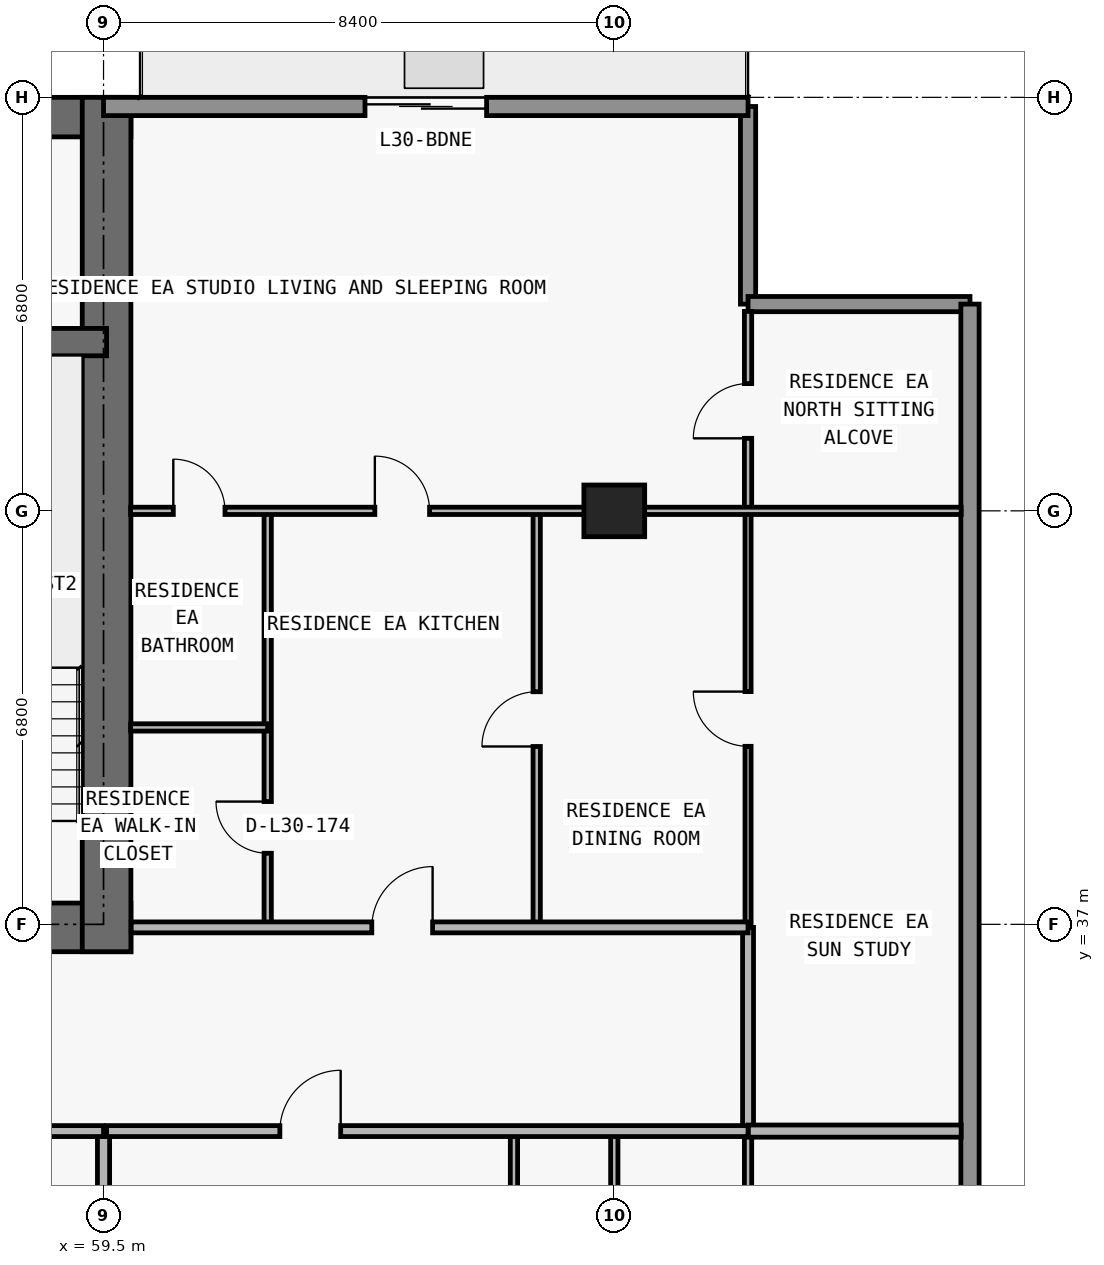
"""IFC4 building model, lengths in metres.
Left out: names, types, materials, properties, quantities, classifications, styles, units other than length and angle.
Written with IfcOpenShell. Run it as: python <this file> out.ifc"""

import sys

from ifc_helpers import new_model, si_unit, direction, frame, frame_2d, origin, origin_2d, place, context, subcontext, project, spatial, rectangle, extrude, element, fill, save


model = new_model("IFC4")
c1 = context("Model", 3, precision=1e-05, world=origin(), true_north=direction((0.0, 1.0)))
c2 = subcontext(c1, "Body", "Model", "MODEL_VIEW")
j1 = project(units=[si_unit("LENGTHUNIT", "METRE"), si_unit("PLANEANGLEUNIT", "RADIAN")], contexts=[c1])
p1 = place(None, origin())
s1 = spatial("IfcSite", under=j1, at=p1, CompositionType="ELEMENT")
p2 = place(p1, origin())
s2 = spatial("IfcBuilding", under=s1, at=p2, CompositionType="ELEMENT")
p3 = place(p2, frame((0.0, 0.0, 112.5)))
s3 = spatial("IfcBuildingStorey", under=s2, at=p3, CompositionType="ELEMENT", Elevation=112.5)
p4 = place(p3, frame((67.9, 43.8, 0.0), z_axis=(0.0, 0.0, 1.0), x_axis=(1.0, 0.0, 0.0)))
e1 = element("IfcColumn", 1, at=p4, inside=s3, PredefinedType="COLUMN", context=c2, shape_type="SweptSolid", body=[
    extrude(rectangle(XDim=1.0, YDim=0.85, at=origin_2d()), origin(), (0.0, 0.0, 1.0), 3.05),
])
p5 = place(p3, frame((17.85, 36.95, 0.0), z_axis=(0.0, 0.0, 1.0), x_axis=(1.0, 0.0, 0.0)))
e2 = element("IfcWall", 2, at=p5, inside=s3, PredefinedType="SHEAR", context=c2, shape_type="SweptSolid", body=[
    extrude(rectangle(XDim=42.1, YDim=0.8, at=frame_2d((21.05, 0.0))), origin(), (0.0, 0.0, 1.0), 3.05),
])
p6 = place(p5, frame((14.45, 0.0, 0.0)))
e3 = element("IfcOpeningElement", 3, at=p6, cuts=e2, PredefinedType="OPENING", context=c2, shape_type="SweptSolid", body=[
    extrude(rectangle(XDim=1.1, YDim=2.15, at=frame_2d((0.55, 1.075))), frame((0.0, 0.41, 0.0), z_axis=(0.0, -1.0, 0.0), x_axis=(1.0, 0.0, 0.0)), (0.0, 0.0, 1.0), 0.82),
])
p7 = place(p5, frame((6.3, 0.0, 0.0)))
e4 = element("IfcOpeningElement", 4, at=p7, cuts=e2, PredefinedType="OPENING", context=c2, shape_type="SweptSolid", body=[
    extrude(rectangle(XDim=1.05, YDim=2.15, at=frame_2d((0.525, 1.075))), frame((0.0, 0.41, 0.0), z_axis=(0.0, -1.0, 0.0), x_axis=(1.0, 0.0, 0.0)), (0.0, 0.0, 1.0), 0.82),
])
p8 = place(p5, frame((34.8, 0.0, 0.0)))
e5 = element("IfcOpeningElement", 5, at=p8, cuts=e2, PredefinedType="OPENING", context=c2, shape_type="SweptSolid", body=[
    extrude(rectangle(XDim=1.05, YDim=2.15, at=frame_2d((0.525, 1.075))), frame((0.0, 0.41, 0.0), z_axis=(0.0, -1.0, 0.0), x_axis=(1.0, 0.0, 0.0)), (0.0, 0.0, 1.0), 0.82),
])
p9 = place(p5, frame((10.913, 0.0, 0.0)))
e6 = element("IfcOpeningElement", 6, at=p9, cuts=e2, PredefinedType="OPENING", context=c2, shape_type="SweptSolid", body=[
    extrude(rectangle(XDim=1.05, YDim=2.15, at=frame_2d((0.525, 1.075))), frame((0.0, 0.41, 0.0), z_axis=(0.0, -1.0, 0.0), x_axis=(1.0, 0.0, 0.0)), (0.0, 0.0, 1.0), 0.82),
])
p10 = place(p5, frame((24.15, 0.0, 0.0)))
e7 = element("IfcOpeningElement", 7, at=p10, cuts=e2, PredefinedType="OPENING", context=c2, shape_type="SweptSolid", body=[
    extrude(rectangle(XDim=1.05, YDim=2.15, at=frame_2d((0.525, 1.075))), frame((0.0, 0.41, 0.0), z_axis=(0.0, -1.0, 0.0), x_axis=(1.0, 0.0, 0.0)), (0.0, 0.0, 1.0), 0.82),
])
p11 = place(p3, frame((17.85, 50.275, 0.0), z_axis=(0.0, 0.0, 1.0), x_axis=(1.0, 0.0, 0.0)))
e8 = element("IfcWall", 8, at=p11, inside=s3, PredefinedType="SHEAR", context=c2, shape_type="SweptSolid", body=[
    extrude(rectangle(XDim=42.1, YDim=0.65, at=frame_2d((21.05, 0.0))), origin(), (0.0, 0.0, 1.0), 3.05),
])
p12 = place(p3, frame((59.55, 36.55, 0.0), z_axis=(0.0, 0.0, 1.0), x_axis=(0.0, 1.0, 0.0)))
e9 = element("IfcWall", 9, at=p12, inside=s3, PredefinedType="SHEAR", context=c2, shape_type="SweptSolid", body=[
    extrude(rectangle(XDim=14.05, YDim=0.8, at=frame_2d((7.025, 0.0))), origin(), (0.0, 0.0, 1.0), 3.05),
])
p13 = place(p3, frame((18.25, 46.575, 0.0), z_axis=(0.0, 0.0, 1.0), x_axis=(1.0, 0.0, 0.0)))
e10 = element("IfcWall", 10, at=p13, inside=s3, PredefinedType="SHEAR", context=c2, shape_type="SweptSolid", body=[
    extrude(rectangle(XDim=41.3, YDim=0.45, at=frame_2d((20.65, 0.0))), origin(), (0.0, 0.0, 1.0), 3.05),
])
p14 = place(p13, frame((7.625, 0.0, 0.0)))
e11 = element("IfcOpeningElement", 11, at=p14, cuts=e10, PredefinedType="OPENING", context=c2, shape_type="SweptSolid", body=[
    extrude(rectangle(XDim=1.05, YDim=2.15, at=frame_2d((0.525, 1.075))), frame((0.0, 0.235, 0.0), z_axis=(0.0, -1.0, 0.0), x_axis=(1.0, 0.0, 0.0)), (0.0, 0.0, 1.0), 0.47),
])
p15 = place(p13, frame((32.675, 0.0, 0.0)))
e12 = element("IfcOpeningElement", 12, at=p15, cuts=e10, PredefinedType="OPENING", context=c2, shape_type="SweptSolid", body=[
    extrude(rectangle(XDim=1.05, YDim=2.15, at=frame_2d((0.525, 1.075))), frame((0.0, 0.235, 0.0), z_axis=(0.0, -1.0, 0.0), x_axis=(1.0, 0.0, 0.0)), (0.0, 0.0, 1.0), 0.47),
])
p16 = place(p3, frame((70.1, 50.45, 0.0), z_axis=(0.0, 0.0, 1.0), x_axis=(0.0, -1.0, 0.0)))
e13 = element("IfcWall", 13, at=p16, inside=s3, PredefinedType="ELEMENTEDWALL", context=c2, shape_type="SweptSolid", body=[
    extrude(rectangle(XDim=3.25, YDim=0.25, at=frame_2d((1.625, 0.0))), origin(), (0.0, 0.0, 1.0), 3.05),
])
p17 = place(p3, frame((70.1, 47.2, 0.0), z_axis=(0.0, 0.0, 1.0), x_axis=(1.0, 0.0, 0.0)))
e14 = element("IfcWall", 14, at=p17, inside=s3, PredefinedType="ELEMENTEDWALL", context=c2, shape_type="SweptSolid", body=[
    extrude(rectangle(XDim=3.65, YDim=0.25, at=frame_2d((1.825, 0.0))), origin(), (0.0, 0.0, 1.0), 3.05),
])
p18 = place(p3, frame((73.75, 47.2, 0.0), z_axis=(0.0, 0.0, 1.0), x_axis=(0.0, -1.0, 0.0)))
e15 = element("IfcWall", 15, at=p18, inside=s3, PredefinedType="STANDARD", context=c2, shape_type="SweptSolid", body=[
    extrude(rectangle(XDim=19.2, YDim=0.3, at=frame_2d((9.6, 0.0))), origin(), (0.0, 0.0, 1.0), 3.05),
])
p19 = place(p3, frame((59.5, 50.45, 0.0), z_axis=(0.0, 0.0, 1.0), x_axis=(1.0, 0.0, 0.0)))
e16 = element("IfcWall", 16, at=p19, inside=s3, PredefinedType="STANDARD", context=c2, shape_type="SweptSolid", body=[
    extrude(rectangle(XDim=10.6, YDim=0.3, at=frame_2d((5.3, 0.0))), origin(), (0.0, 0.0, 1.0), 3.05),
])
p20 = place(p19, frame((4.3, 0.0, 0.0)))
e17 = element("IfcOpeningElement", 17, at=p20, cuts=e16, PredefinedType="OPENING", context=c2, shape_type="SweptSolid", body=[
    extrude(rectangle(XDim=2.0, YDim=2.3, at=frame_2d((1.0, 1.15))), frame((0.0, 0.16, 0.0), z_axis=(0.0, -1.0, 0.0), x_axis=(1.0, 0.0, 0.0)), (0.0, 0.0, 1.0), 0.32),
])
p21 = place(p3, frame((59.5, 27.08, 0.0), z_axis=(0.0, 0.0, 1.0), x_axis=(0.0, 1.0, 0.0)))
e18 = element("IfcWall", 18, at=p21, inside=s3, PredefinedType="PARTITIONING", context=c2, shape_type="SweptSolid", body=[
    extrude(rectangle(XDim=6.52, YDim=0.2, at=frame_2d((3.26, 0.0))), origin(), (0.0, 0.0, 1.0), 2.174),
])
p22 = place(p3, frame((62.2, 36.95, 0.0), z_axis=(0.0, 0.0, 1.0), x_axis=(0.0, 1.0, 0.0)))
e19 = element("IfcWall", 19, at=p22, inside=s3, PredefinedType="PARTITIONING", context=c2, shape_type="SweptSolid", body=[
    extrude(rectangle(XDim=6.85, YDim=0.12, at=frame_2d((3.425, 0.0))), origin(), (0.0, 0.0, 1.0), 3.05),
])
p23 = place(p22, frame((1.219, 0.0, 0.0)))
e20 = element("IfcOpeningElement", 20, at=p23, cuts=e19, PredefinedType="OPENING", context=c2, shape_type="SweptSolid", body=[
    extrude(rectangle(XDim=0.85, YDim=2.1, at=frame_2d((0.425, 1.05))), frame((0.0, 0.07, 0.0), z_axis=(0.0, -1.0, 0.0), x_axis=(1.0, 0.0, 0.0)), (0.0, 0.0, 1.0), 0.14),
])
p24 = place(p3, frame((66.25, 27.08, 0.0), z_axis=(0.0, 0.0, 1.0), x_axis=(0.0, 1.0, 0.0)))
e21 = element("IfcWall", 21, at=p24, inside=s3, PredefinedType="PARTITIONING", context=c2, shape_type="SweptSolid", body=[
    extrude(rectangle(XDim=6.52, YDim=0.12, at=frame_2d((3.26, 0.0))), origin(), (0.0, 0.0, 1.0), 3.05),
])
p25 = place(p24, frame((3.285, 0.0, 0.0)))
e22 = element("IfcOpeningElement", 22, at=p25, cuts=e21, PredefinedType="OPENING", context=c2, shape_type="SweptSolid", body=[
    extrude(rectangle(XDim=0.85, YDim=2.1, at=frame_2d((0.425, 1.05))), frame((0.0, 0.07, 0.0), z_axis=(0.0, -1.0, 0.0), x_axis=(1.0, 0.0, 0.0)), (0.0, 0.0, 1.0), 0.14),
])
p26 = place(p3, frame((66.624, 36.95, 0.0), z_axis=(0.0, 0.0, 1.0), x_axis=(0.0, 1.0, 0.0)))
e23 = element("IfcWall", 23, at=p26, inside=s3, PredefinedType="PARTITIONING", context=c2, shape_type="SweptSolid", body=[
    extrude(rectangle(XDim=6.85, YDim=0.12, at=frame_2d((3.425, 0.0))), origin(), (0.0, 0.0, 1.0), 3.05),
])
p27 = place(p26, frame((2.975, 0.0, 0.0)))
e24 = element("IfcOpeningElement", 24, at=p27, cuts=e23, PredefinedType="OPENING", context=c2, shape_type="SweptSolid", body=[
    extrude(rectangle(XDim=0.9, YDim=2.15, at=frame_2d((0.45, 1.075))), frame((0.0, 0.07, 0.0), z_axis=(0.0, -1.0, 0.0), x_axis=(1.0, 0.0, 0.0)), (0.0, 0.0, 1.0), 0.14),
])
p28 = place(p3, frame((67.9, 27.08, 0.0), z_axis=(0.0, 0.0, 1.0), x_axis=(0.0, 1.0, 0.0)))
e25 = element("IfcWall", 25, at=p28, inside=s3, PredefinedType="PARTITIONING", context=c2, shape_type="SweptSolid", body=[
    extrude(rectangle(XDim=6.52, YDim=0.12, at=frame_2d((3.26, 0.0))), origin(), (0.0, 0.0, 1.0), 2.174),
])
p29 = place(p3, frame((70.1, 27.08, 0.0), z_axis=(0.0, 0.0, 1.0), x_axis=(0.0, 1.0, 0.0)))
e26 = element("IfcWall", 26, at=p29, inside=s3, PredefinedType="PARTITIONING", context=c2, shape_type="SweptSolid", body=[
    extrude(rectangle(XDim=6.52, YDim=0.12, at=frame_2d((3.26, 0.0))), origin(), (0.0, 0.0, 1.0), 3.05),
])
p30 = place(p3, frame((70.1, 33.605, 0.0), z_axis=(0.0, 0.0, 1.0), x_axis=(0.0, 1.0, 0.0)))
e27 = element("IfcWall", 27, at=p30, inside=s3, PredefinedType="PARTITIONING", context=c2, shape_type="SweptSolid", body=[
    extrude(rectangle(XDim=3.345, YDim=0.18, at=frame_2d((1.672, 0.0))), origin(), (0.0, 0.0, 1.0), 3.05),
])
p31 = place(p3, frame((70.1, 36.955, 0.0), z_axis=(0.0, 0.0, 1.0), x_axis=(0.0, 1.0, 0.0)))
e28 = element("IfcWall", 28, at=p31, inside=s3, PredefinedType="MOVABLE", context=c2, shape_type="SweptSolid", body=[
    extrude(rectangle(XDim=6.845, YDim=0.1, at=frame_2d((3.422, 0.0))), origin(), (0.0, 0.0, 1.0), 3.05),
])
p32 = place(p31, frame((2.972, 0.0, 0.0)))
e29 = element("IfcOpeningElement", 29, at=p32, cuts=e28, PredefinedType="OPENING", context=c2, shape_type="SweptSolid", body=[
    extrude(rectangle(XDim=0.9, YDim=2.15, at=frame_2d((0.45, 1.075))), frame((0.0, 0.06, 0.0), z_axis=(0.0, -1.0, 0.0), x_axis=(1.0, 0.0, 0.0)), (0.0, 0.0, 1.0), 0.12),
])
p33 = place(p3, frame((70.1, 43.805, 0.0), z_axis=(0.0, 0.0, 1.0), x_axis=(0.0, 1.0, 0.0)))
e30 = element("IfcWall", 30, at=p33, inside=s3, PredefinedType="PARTITIONING", context=c2, shape_type="SweptSolid", body=[
    extrude(rectangle(XDim=3.275, YDim=0.12, at=frame_2d((1.638, 0.0))), origin(), (0.0, 0.0, 1.0), 3.05),
])
p34 = place(p33, frame((1.188, 0.0, 0.0)))
e31 = element("IfcOpeningElement", 31, at=p34, cuts=e30, PredefinedType="OPENING", context=c2, shape_type="SweptSolid", body=[
    extrude(rectangle(XDim=0.9, YDim=2.15, at=frame_2d((0.45, 1.075))), frame((0.0, 0.07, 0.0), z_axis=(0.0, -1.0, 0.0), x_axis=(1.0, 0.0, 0.0)), (0.0, 0.0, 1.0), 0.14),
])
p35 = place(p3, frame((18.3, 33.6, 0.0), z_axis=(0.0, 0.0, 1.0), x_axis=(1.0, 0.0, 0.0)))
e32 = element("IfcWall", 32, at=p35, inside=s3, PredefinedType="PARTITIONING", context=c2, shape_type="SweptSolid", body=[
    extrude(rectangle(XDim=41.2, YDim=0.18, at=frame_2d((20.6, 0.0))), origin(), (0.0, 0.0, 1.0), 3.05),
])
p36 = place(p35, frame((11.35, 0.0, 0.0)))
e33 = element("IfcOpeningElement", 33, at=p36, cuts=e32, PredefinedType="OPENING", context=c2, shape_type="SweptSolid", body=[
    extrude(rectangle(XDim=1.0, YDim=2.2, at=frame_2d((0.5, 1.1))), frame((0.0, 0.1, 0.0), z_axis=(0.0, -1.0, 0.0), x_axis=(1.0, 0.0, 0.0)), (0.0, 0.0, 1.0), 0.2),
])
p37 = place(p35, frame((27.275, 0.0, 0.0)))
e34 = element("IfcOpeningElement", 34, at=p37, cuts=e32, PredefinedType="OPENING", context=c2, shape_type="SweptSolid", body=[
    extrude(rectangle(XDim=1.0, YDim=2.2, at=frame_2d((0.5, 1.1))), frame((0.0, 0.1, 0.0), z_axis=(0.0, -1.0, 0.0), x_axis=(1.0, 0.0, 0.0)), (0.0, 0.0, 1.0), 0.2),
])
p38 = place(p35, frame((35.675, 0.0, 0.0)))
e35 = element("IfcOpeningElement", 35, at=p38, cuts=e32, PredefinedType="OPENING", context=c2, shape_type="SweptSolid", body=[
    extrude(rectangle(XDim=1.0, YDim=2.2, at=frame_2d((0.5, 1.1))), frame((0.0, 0.1, 0.0), z_axis=(0.0, -1.0, 0.0), x_axis=(1.0, 0.0, 0.0)), (0.0, 0.0, 1.0), 0.2),
])
p39 = place(p3, frame((59.55, 33.6, 0.0), z_axis=(0.0, 0.0, 1.0), x_axis=(1.0, 0.0, 0.0)))
e36 = element("IfcWall", 36, at=p39, inside=s3, PredefinedType="PARTITIONING", context=c2, shape_type="SweptSolid", body=[
    extrude(rectangle(XDim=10.55, YDim=0.18, at=frame_2d((5.275, 0.0))), origin(), (0.0, 0.0, 1.0), 3.05),
])
p40 = place(p39, frame((2.85, 0.0, 0.0)))
e37 = element("IfcOpeningElement", 37, at=p40, cuts=e36, PredefinedType="OPENING", context=c2, shape_type="SweptSolid", body=[
    extrude(rectangle(XDim=1.0, YDim=2.2, at=frame_2d((0.5, 1.1))), frame((0.0, 0.1, 0.0), z_axis=(0.0, -1.0, 0.0), x_axis=(1.0, 0.0, 0.0)), (0.0, 0.0, 1.0), 0.2),
])
p41 = place(p3, frame((70.105, 33.6, 0.0), z_axis=(0.0, 0.0, 1.0), x_axis=(1.0, 0.0, 0.0)))
e38 = element("IfcWall", 38, at=p41, inside=s3, PredefinedType="PARTITIONING", context=c2, shape_type="SweptSolid", body=[
    extrude(rectangle(XDim=3.5, YDim=0.2, at=frame_2d((1.75, 0.0))), origin(), (0.0, 0.0, 1.0), 3.05),
])
p42 = place(p3, frame((59.955, 36.95, 0.0), z_axis=(0.0, 0.0, 1.0), x_axis=(1.0, 0.0, 0.0)))
e39 = element("IfcWall", 39, at=p42, inside=s3, PredefinedType="PARTITIONING", context=c2, shape_type="SweptSolid", body=[
    extrude(rectangle(XDim=10.145, YDim=0.18, at=frame_2d((5.073, 0.0))), origin(), (0.0, 0.0, 1.0), 3.05),
])
p43 = place(p42, frame((3.957, 0.0, 0.0)))
e40 = element("IfcOpeningElement", 40, at=p43, cuts=e39, PredefinedType="OPENING", context=c2, shape_type="SweptSolid", body=[
    extrude(rectangle(XDim=1.0, YDim=2.2, at=frame_2d((0.5, 1.1))), frame((0.0, 0.1, 0.0), z_axis=(0.0, -1.0, 0.0), x_axis=(1.0, 0.0, 0.0)), (0.0, 0.0, 1.0), 0.2),
])
p44 = place(p3, frame((59.945, 40.238, 0.0), z_axis=(0.0, 0.0, 1.0), x_axis=(1.0, 0.0, 0.0)))
e41 = element("IfcWall", 41, at=p44, inside=s3, PredefinedType="PARTITIONING", context=c2, shape_type="SweptSolid", body=[
    extrude(rectangle(XDim=2.255, YDim=0.12, at=frame_2d((1.127, 0.0))), origin(), (0.0, 0.0, 1.0), 3.05),
])
p45 = place(p3, frame((59.945, 43.8, 0.0), z_axis=(0.0, 0.0, 1.0), x_axis=(1.0, 0.0, 0.0)))
e42 = element("IfcWall", 42, at=p45, inside=s3, PredefinedType="PARTITIONING", context=c2, shape_type="SweptSolid", body=[
    extrude(rectangle(XDim=13.66, YDim=0.12, at=frame_2d((6.83, 0.0))), origin(), (0.0, 0.0, 1.0), 2.339),
])
p46 = place(p45, frame((4.017, 0.0, 0.0)))
e43 = element("IfcOpeningElement", 43, at=p46, cuts=e42, PredefinedType="OPENING", context=c2, shape_type="SweptSolid", body=[
    extrude(rectangle(XDim=0.9, YDim=2.15, at=frame_2d((0.45, 1.075))), frame((0.0, 0.07, 0.0), z_axis=(0.0, -1.0, 0.0), x_axis=(1.0, 0.0, 0.0)), (0.0, 0.0, 1.0), 0.14),
])
p47 = place(p45, frame((0.702, 0.0, 0.0)))
e44 = element("IfcOpeningElement", 44, at=p47, cuts=e42, PredefinedType="OPENING", context=c2, shape_type="SweptSolid", body=[
    extrude(rectangle(XDim=0.85, YDim=2.1, at=frame_2d((0.425, 1.05))), frame((0.0, 0.07, 0.0), z_axis=(0.0, -1.0, 0.0), x_axis=(1.0, 0.0, 0.0)), (0.0, 0.0, 1.0), 0.14),
])
p48 = place(p20, origin())
e45 = element("IfcDoor", 45, at=p48, inside=s3, OperationType="DOUBLE_DOOR_SLIDING", PredefinedType="DOOR", context=c2, shape_type="SweptSolid", body=[
    extrude(rectangle(XDim=2.0, YDim=2.3, at=frame_2d((1.0, 1.15))), frame((0.0, 0.025, 0.0), z_axis=(0.0, -1.0, 0.0), x_axis=(1.0, 0.0, 0.0)), (0.0, 0.0, 1.0), 0.05),
])
fill(e17, e45)
p49 = place(p40, origin())
e46 = element("IfcDoor", 46, at=p49, inside=s3, OperationType="SINGLE_SWING_RIGHT", PredefinedType="DOOR", context=c2, shape_type="SweptSolid", body=[
    extrude(rectangle(XDim=1.0, YDim=2.2, at=frame_2d((0.5, 1.1))), frame((0.0, 0.025, 0.0), z_axis=(0.0, -1.0, 0.0), x_axis=(1.0, 0.0, 0.0)), (0.0, 0.0, 1.0), 0.05),
])
fill(e37, e46)
p50 = place(p27, origin())
e47 = element("IfcDoor", 47, at=p50, inside=s3, OperationType="SINGLE_SWING_LEFT", PredefinedType="DOOR", context=c2, shape_type="SweptSolid", body=[
    extrude(rectangle(XDim=0.9, YDim=2.15, at=frame_2d((0.45, 1.075))), frame((0.0, 0.025, 0.0), z_axis=(0.0, -1.0, 0.0), x_axis=(1.0, 0.0, 0.0)), (0.0, 0.0, 1.0), 0.05),
])
fill(e24, e47)
p51 = place(p43, origin())
e48 = element("IfcDoor", 48, at=p51, inside=s3, OperationType="SINGLE_SWING_RIGHT", PredefinedType="DOOR", context=c2, shape_type="SweptSolid", body=[
    extrude(rectangle(XDim=1.0, YDim=2.2, at=frame_2d((0.5, 1.1))), frame((0.0, 0.025, 0.0), z_axis=(0.0, -1.0, 0.0), x_axis=(1.0, 0.0, 0.0)), (0.0, 0.0, 1.0), 0.05),
])
fill(e40, e48)
p52 = place(p46, origin())
e49 = element("IfcDoor", 49, at=p52, inside=s3, OperationType="SINGLE_SWING_LEFT", PredefinedType="DOOR", context=c2, shape_type="SweptSolid", body=[
    extrude(rectangle(XDim=0.9, YDim=2.15, at=frame_2d((0.45, 1.075))), frame((0.0, 0.025, 0.0), z_axis=(0.0, -1.0, 0.0), x_axis=(1.0, 0.0, 0.0)), (0.0, 0.0, 1.0), 0.05),
])
fill(e43, e49)
p53 = place(p23, origin())
e50 = element("IfcDoor", 50, at=p53, inside=s3, OperationType="SINGLE_SWING_RIGHT", PredefinedType="DOOR", context=c2, shape_type="SweptSolid", body=[
    extrude(rectangle(XDim=0.85, YDim=2.1, at=frame_2d((0.425, 1.05))), frame((0.0, 0.025, 0.0), z_axis=(0.0, -1.0, 0.0), x_axis=(1.0, 0.0, 0.0)), (0.0, 0.0, 1.0), 0.05),
])
fill(e20, e50)
p54 = place(p47, origin())
e51 = element("IfcDoor", 51, at=p54, inside=s3, OperationType="SINGLE_SWING_LEFT", PredefinedType="DOOR", context=c2, shape_type="SweptSolid", body=[
    extrude(rectangle(XDim=0.85, YDim=2.1, at=frame_2d((0.425, 1.05))), frame((0.0, 0.025, 0.0), z_axis=(0.0, -1.0, 0.0), x_axis=(1.0, 0.0, 0.0)), (0.0, 0.0, 1.0), 0.05),
])
fill(e44, e51)
p55 = place(p32, origin())
e52 = element("IfcDoor", 52, at=p55, inside=s3, OperationType="SINGLE_SWING_RIGHT", PredefinedType="DOOR", context=c2, shape_type="SweptSolid", body=[
    extrude(rectangle(XDim=0.9, YDim=2.15, at=frame_2d((0.45, 1.075))), frame((0.0, 0.025, 0.0), z_axis=(0.0, -1.0, 0.0), x_axis=(1.0, 0.0, 0.0)), (0.0, 0.0, 1.0), 0.05),
])
fill(e29, e52)
p56 = place(p34, origin())
e53 = element("IfcDoor", 53, at=p56, inside=s3, OperationType="SINGLE_SWING_LEFT", PredefinedType="DOOR", context=c2, shape_type="SweptSolid", body=[
    extrude(rectangle(XDim=0.9, YDim=2.15, at=frame_2d((0.45, 1.075))), frame((0.0, 0.025, 0.0), z_axis=(0.0, -1.0, 0.0), x_axis=(1.0, 0.0, 0.0)), (0.0, 0.0, 1.0), 0.05),
])
fill(e31, e53)
save(model, sys.argv[1])
